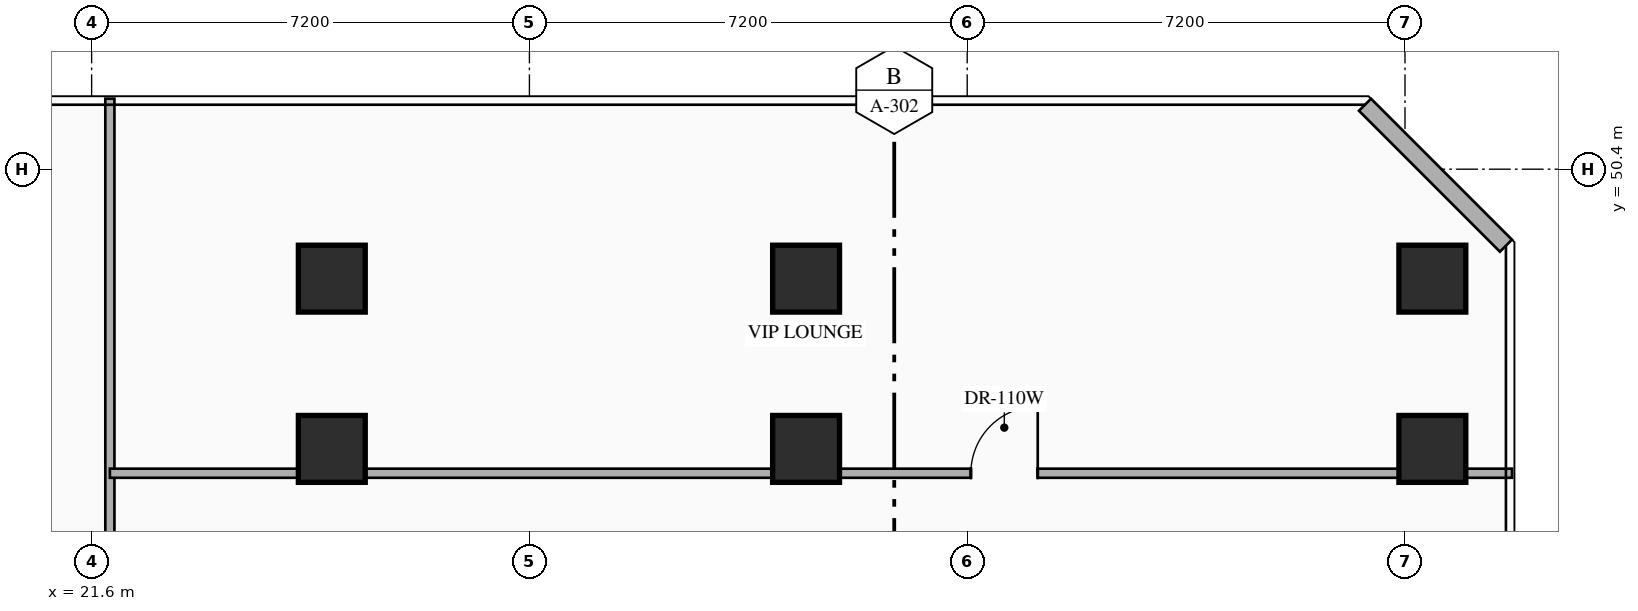
"""IFC4 building model, lengths in metres.
Left out: names, types, materials, properties, quantities, classifications, styles, units other than length and angle.
Written with IfcOpenShell. Run it as: python <this file> out.ifc"""

import sys

from ifc_helpers import new_model, si_unit, direction, frame, frame_2d, origin, origin_2d, place, context, subcontext, project, spatial, rectangle, hollow_rectangle, extrude, element, fill, save


model = new_model("IFC4")
c1 = context("Model", 3, precision=1e-05, world=origin(), true_north=direction((0.0, 1.0)))
c2 = subcontext(c1, "Body", "Model", "MODEL_VIEW")
j1 = project(units=[si_unit("LENGTHUNIT", "METRE"), si_unit("PLANEANGLEUNIT", "RADIAN")], contexts=[c1])
p1 = place(None, origin())
s1 = spatial("IfcSite", under=j1, at=p1, CompositionType="ELEMENT")
p2 = place(p1, origin())
s2 = spatial("IfcBuilding", under=s1, at=p2, CompositionType="ELEMENT")
p3 = place(p2, frame((0.0, 0.0, 5.4)))
s3 = spatial("IfcBuildingStorey", under=s2, at=p3, CompositionType="ELEMENT", Elevation=5.4)
for number, where, z_axis, x_axis in (
    (1, (25.55, 45.8, 0.0), (0.0, 0.0, 1.0), (1.0, 0.0, 0.0)),
    (2, (33.35, 45.8, 0.0), (0.0, 0.0, 1.0), (1.0, 0.0, 0.0)),
    (3, (43.65, 45.8, 0.0), (0.0, 0.0, 1.0), (1.0, 0.0, 0.0)),
    (4, (25.55, 48.6, 0.0), (0.0, 0.0, 1.0), (1.0, 0.0, 0.0)),
    (5, (33.35, 48.6, 0.0), (0.0, 0.0, 1.0), (1.0, 0.0, 0.0)),
    (6, (43.65, 48.6, 0.0), (0.0, 0.0, 1.0), (1.0, 0.0, 0.0)),
):
    element("IfcColumn", number, at=place(p3, frame(where, z_axis=z_axis, x_axis=x_axis)), inside=s3, PredefinedType="COLUMN", context=c2, shape_type="SweptSolid", body=[
        extrude(hollow_rectangle(XDim=1.1, YDim=1.1, WallThickness=0.04, at=origin_2d()), origin(), (0.0, 0.0, 1.0), 5.4),
    ])
p4 = place(p3, frame((42.542, 51.46, 0.0), z_axis=(0.0, 0.0, 1.0), x_axis=(0.707144017911, -0.707069542501, 0.0)))
e7 = element("IfcWall", 7, at=p4, inside=s3, PredefinedType="STANDARD", context=c2, shape_type="SweptSolid", body=[
    extrude(rectangle(XDim=3.278, YDim=0.28, at=frame_2d((1.639, 0.0))), origin(), (0.0, 0.0, 1.0), 5.1),
])
p5 = place(p3, frame((21.9, 40.1, 0.0), z_axis=(0.0, 0.0, 1.0), x_axis=(0.0, 1.0, 0.0)))
e8 = element("IfcWall", 8, at=p5, inside=s3, PredefinedType="PARTITIONING", context=c2, shape_type="SweptSolid", body=[
    extrude(rectangle(XDim=11.46, YDim=0.15, at=frame_2d((5.73, 0.0))), origin(), (0.0, 0.0, 1.0), 5.1),
])
p6 = place(p3, frame((21.9, 45.4, 0.0), z_axis=(0.0, 0.0, 1.0), x_axis=(1.0, 0.0, 0.0)))
e9 = element("IfcWall", 9, at=p6, inside=s3, PredefinedType="PARTITIONING", context=c2, shape_type="SweptSolid", body=[
    extrude(rectangle(XDim=23.06, YDim=0.15, at=frame_2d((11.53, 0.0))), origin(), (0.0, 0.0, 1.0), 5.1),
])
p7 = place(p6, frame((14.16, 0.0, 0.0)))
e10 = element("IfcOpeningElement", 10, at=p7, cuts=e9, PredefinedType="OPENING", context=c2, shape_type="SweptSolid", body=[
    extrude(rectangle(XDim=1.1, YDim=2.16, at=frame_2d((0.55, 1.08))), frame((0.0, 0.085, 0.0), z_axis=(0.0, -1.0, 0.0), x_axis=(1.0, 0.0, 0.0)), (0.0, 0.0, 1.0), 0.17),
])
p8 = place(p7, origin())
e11 = element("IfcDoor", 11, at=p8, inside=s3, OperationType="SINGLE_SWING_RIGHT", PredefinedType="DOOR", context=c2, shape_type="SweptSolid", body=[
    extrude(rectangle(XDim=1.1, YDim=2.16, at=frame_2d((0.55, 1.08))), frame((0.0, 0.025, 0.0), z_axis=(0.0, -1.0, 0.0), x_axis=(1.0, 0.0, 0.0)), (0.0, 0.0, 1.0), 0.05),
])
fill(e10, e11)
save(model, sys.argv[1])
